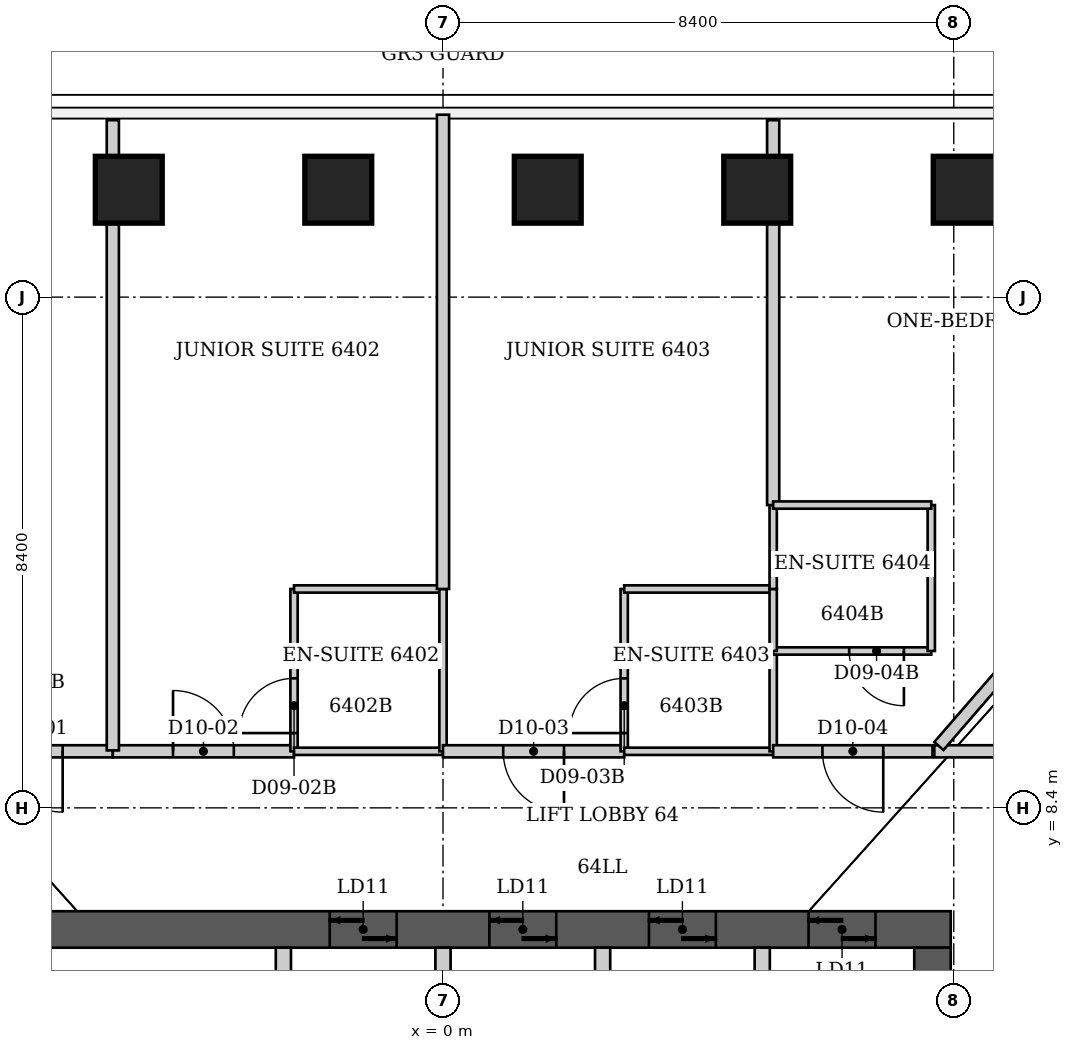
"""IFC4 building model, lengths in metres.
Left out: names, types, materials, properties, quantities, classifications, styles, units other than length and angle.
Written with IfcOpenShell. Run it as: python <this file> out.ifc"""

import sys

from ifc_helpers import new_model, si_unit, direction, frame, frame_2d, origin, origin_2d, place, context, subcontext, project, spatial, rectangle, extrude, clip, halfspace, element, fill, save


model = new_model("IFC4")
c1 = context("Model", 3, precision=1e-05, world=origin(), true_north=direction((0.0, 1.0)))
c2 = subcontext(c1, "Body", "Model", "MODEL_VIEW")
j1 = project(units=[si_unit("LENGTHUNIT", "METRE"), si_unit("PLANEANGLEUNIT", "RADIAN")], contexts=[c1])
p1 = place(None, origin())
s1 = spatial("IfcSite", under=j1, at=p1, CompositionType="ELEMENT")
p2 = place(p1, origin())
s2 = spatial("IfcBuilding", under=s1, at=p2, CompositionType="ELEMENT")
p3 = place(p2, frame((0.0, 0.0, 257.0)))
s3 = spatial("IfcBuildingStorey", under=s2, at=p3, CompositionType="ELEMENT", Elevation=257.0)
p4 = place(p3, frame((-5.167, 18.566, -0.052), z_axis=(0.0, 0.0, 1.0), x_axis=(0.0, 1.0, 0.0)))
e1 = element("IfcColumn", 1, at=p4, inside=s3, PredefinedType="COLUMN", context=c2, shape_type="SweptSolid", body=[
    clip(extrude(rectangle(XDim=1.1, YDim=1.1, at=origin_2d()), origin(), (0.0, 0.0, 1.0), 3.852), halfspace(frame((0.0, 0.0, 0.052)), True)),
])
for number, where, z_axis, x_axis in (
    (2, (-1.722, 18.566, -0.045), (0.0, 0.0, 1.0), (0.0, 1.0, 0.0)),
    (3, (1.722, 18.566, -0.045), (0.0, 0.0, 1.0), (0.0, 1.0, 0.0)),
):
    element("IfcColumn", number, at=place(p3, frame(where, z_axis=z_axis, x_axis=x_axis)), inside=s3, PredefinedType="COLUMN", context=c2, shape_type="SweptSolid", body=[
        clip(extrude(rectangle(XDim=1.1, YDim=1.1, at=origin_2d()), origin(), (0.0, 0.0, 1.0), 3.845), halfspace(frame((0.0, 0.0, 0.045)), True)),
    ])
p5 = place(p3, frame((5.167, 18.566, -0.052), z_axis=(0.0, 0.0, 1.0), x_axis=(0.0, 1.0, 0.0)))
e4 = element("IfcColumn", 4, at=p5, inside=s3, PredefinedType="COLUMN", context=c2, shape_type="SweptSolid", body=[
    clip(extrude(rectangle(XDim=1.1, YDim=1.1, at=origin_2d()), origin(), (0.0, 0.0, 1.0), 3.852), halfspace(frame((0.0, 0.0, 0.052)), True)),
])
p6 = place(p3, frame((8.613, 18.566, -0.06), z_axis=(0.0, 0.0, 1.0), x_axis=(0.0, 1.0, 0.0)))
e5 = element("IfcColumn", 5, at=p6, inside=s3, PredefinedType="COLUMN", context=c2, shape_type="SweptSolid", body=[
    clip(extrude(rectangle(XDim=1.1, YDim=1.1, at=origin_2d()), origin(), (0.0, 0.0, 1.0), 3.86), halfspace(frame((0.0, 0.0, 0.06)), True)),
])
p7 = place(p3, frame((-8.35, 6.4, 0.0), z_axis=(0.0, 0.0, 1.0), x_axis=(1.0, 0.0, 0.0)))
e6 = element("IfcWall", 6, at=p7, inside=s3, PredefinedType="SHEAR", context=c2, shape_type="SweptSolid", body=[
    extrude(rectangle(XDim=16.7, YDim=0.6, at=frame_2d((8.35, 0.0))), origin(), (0.0, 0.0, 1.0), 3.8),
])
p8 = place(p7, frame((6.488, 0.0, 0.0)))
e7 = element("IfcOpeningElement", 7, at=p8, cuts=e6, PredefinedType="OPENING", context=c2, shape_type="SweptSolid", body=[
    extrude(rectangle(XDim=1.1, YDim=2.1, at=frame_2d((0.55, 1.05))), frame((0.0, 0.3, 0.0), z_axis=(0.0, -1.0, 0.0), x_axis=(1.0, 0.0, 0.0)), (0.0, 0.0, 1.0), 0.6),
])
p9 = place(p7, frame((9.113, 0.0, 0.0)))
e8 = element("IfcOpeningElement", 8, at=p9, cuts=e6, PredefinedType="OPENING", context=c2, shape_type="SweptSolid", body=[
    extrude(rectangle(XDim=1.1, YDim=2.1, at=frame_2d((0.55, 1.05))), frame((0.0, 0.3, 0.0), z_axis=(0.0, -1.0, 0.0), x_axis=(1.0, 0.0, 0.0)), (0.0, 0.0, 1.0), 0.6),
])
p10 = place(p7, frame((11.738, 0.0, 0.0)))
e9 = element("IfcOpeningElement", 9, at=p10, cuts=e6, PredefinedType="OPENING", context=c2, shape_type="SweptSolid", body=[
    extrude(rectangle(XDim=1.1, YDim=2.1, at=frame_2d((0.55, 1.05))), frame((0.0, 0.3, 0.0), z_axis=(0.0, -1.0, 0.0), x_axis=(1.0, 0.0, 0.0)), (0.0, 0.0, 1.0), 0.6),
])
p11 = place(p7, frame((14.363, 0.0, 0.0)))
e10 = element("IfcOpeningElement", 10, at=p11, cuts=e6, PredefinedType="OPENING", context=c2, shape_type="SweptSolid", body=[
    extrude(rectangle(XDim=1.1, YDim=2.1, at=frame_2d((0.55, 1.05))), frame((0.0, 0.3, 0.0), z_axis=(0.0, -1.0, 0.0), x_axis=(1.0, 0.0, 0.0)), (0.0, 0.0, 1.0), 0.6),
])
p12 = place(p3, frame((8.05, -6.1, 0.0), z_axis=(0.0, 0.0, 1.0), x_axis=(0.0, 1.0, 0.0)))
e11 = element("IfcWall", 11, at=p12, inside=s3, PredefinedType="SHEAR", context=c2, shape_type="SweptSolid", body=[
    extrude(rectangle(XDim=12.2, YDim=0.6, at=frame_2d((6.1, 0.0))), origin(), (0.0, 0.0, 1.0), 3.8),
])
p13 = place(p12, frame((7.6, 0.0, 0.0)))
e12 = element("IfcOpeningElement", 12, at=p13, cuts=e11, PredefinedType="OPENING", context=c2, shape_type="SweptSolid", body=[
    extrude(rectangle(XDim=1.2, YDim=2.2, at=frame_2d((0.6, 1.1))), frame((0.0, 0.3, 0.0), z_axis=(0.0, -1.0, 0.0), x_axis=(1.0, 0.0, 0.0)), (0.0, 0.0, 1.0), 0.6),
])
for number, where, z_axis, x_axis in (
    (13, (-2.625, 3.35, 0.0), (0.0, 0.0, 1.0), (0.0, 1.0, 0.0)),
    (14, (0.0, 3.35, 0.0), (0.0, 0.0, 1.0), (0.0, 1.0, 0.0)),
    (15, (2.625, 3.35, 0.0), (0.0, 0.0, 1.0), (0.0, 1.0, 0.0)),
    (16, (5.25, 3.35, 0.0), (0.0, 0.0, 1.0), (0.0, 1.0, 0.0)),
):
    element("IfcWall", number, at=place(p3, frame(where, z_axis=z_axis, x_axis=x_axis)), inside=s3, PredefinedType="PARTITIONING", context=c2, shape_type="SweptSolid", body=[
        extrude(rectangle(XDim=2.75, YDim=0.25, at=frame_2d((1.375, 0.0))), origin(), (0.0, 0.0, 1.0), 3.8),
    ])
p14 = place(p3, frame((-5.43, 9.33, 0.0), z_axis=(0.0, 0.0, 1.0), x_axis=(-1.0, 0.0, 0.0)))
e17 = element("IfcWall", 17, at=p14, inside=s3, PredefinedType="PARTITIONING", context=c2, shape_type="SweptSolid", body=[
    extrude(rectangle(XDim=2.65, YDim=0.2, at=frame_2d((1.325, 0.0))), origin(), (0.0, 0.0, 1.0), 3.64),
])
p15 = place(p14, frame((0.825, 0.0, 0.0)))
e18 = element("IfcOpeningElement", 18, at=p15, cuts=e17, PredefinedType="OPENING", context=c2, shape_type="SweptSolid", body=[
    extrude(rectangle(XDim=1.0, YDim=2.13, at=frame_2d((0.5, 1.065))), frame((0.0, 0.1, 0.0), z_axis=(0.0, -1.0, 0.0), x_axis=(1.0, 0.0, 0.0)), (0.0, 0.0, 1.0), 0.2),
])
p16 = place(p3, frame((-5.43, 9.33, 0.0), z_axis=(0.0, 0.0, 1.0), x_axis=(1.0, 0.0, 0.0)))
e19 = element("IfcWall", 19, at=p16, inside=s3, PredefinedType="PARTITIONING", context=c2, shape_type="SweptSolid", body=[
    extrude(rectangle(XDim=2.98, YDim=0.2, at=frame_2d((1.49, 0.0))), origin(), (0.0, 0.0, 1.0), 3.64),
])
p17 = place(p16, frame((0.99, 0.0, 0.0)))
e20 = element("IfcOpeningElement", 20, at=p17, cuts=e19, PredefinedType="OPENING", context=c2, shape_type="SweptSolid", body=[
    extrude(rectangle(XDim=1.0, YDim=2.13, at=frame_2d((0.5, 1.065))), frame((0.0, 0.1, 0.0), z_axis=(0.0, -1.0, 0.0), x_axis=(1.0, 0.0, 0.0)), (0.0, 0.0, 1.0), 0.2),
])
p18 = place(p3, frame((-5.43, 19.71, 0.0), z_axis=(0.0, 0.0, 1.0), x_axis=(0.0, -1.0, 0.0)))
e21 = element("IfcWall", 21, at=p18, inside=s3, PredefinedType="PARTITIONING", context=c2, shape_type="SweptSolid", body=[
    extrude(rectangle(XDim=10.365, YDim=0.2, at=frame_2d((5.183, 0.0))), origin(), (0.0, 0.0, 1.0), 3.64),
])
p19 = place(p3, frame((-2.45, 12.0, 0.0), z_axis=(0.0, 0.0, 1.0), x_axis=(0.0, -1.0, 0.0)))
e22 = element("IfcWall", 22, at=p19, inside=s3, PredefinedType="PARTITIONING", context=c2, shape_type="SweptSolid", body=[
    extrude(rectangle(XDim=2.67, YDim=0.12, at=frame_2d((1.335, 0.0))), origin(), (0.0, 0.0, 1.0), 3.64),
])
p20 = place(p19, frame((1.47, 0.0, 0.0)))
e23 = element("IfcOpeningElement", 23, at=p20, cuts=e22, PredefinedType="OPENING", context=c2, shape_type="SweptSolid", body=[
    extrude(rectangle(XDim=0.9, YDim=2.03, at=frame_2d((0.45, 1.015))), frame((0.0, 0.06, 0.0), z_axis=(0.0, -1.0, 0.0), x_axis=(1.0, 0.0, 0.0)), (0.0, 0.0, 1.0), 0.12),
])
for number, where, z_axis, x_axis in (
    (24, (0.0, 9.33, 0.0), (0.0, 0.0, 1.0), (-1.0, 0.0, 0.0)),
    (25, (0.0, 12.0, 0.0), (0.0, 0.0, 1.0), (-1.0, 0.0, 0.0)),
):
    element("IfcWall", number, at=place(p3, frame(where, z_axis=z_axis, x_axis=x_axis)), inside=s3, PredefinedType="PARTITIONING", context=c2, shape_type="SweptSolid", body=[
        extrude(rectangle(XDim=2.45, YDim=0.12, at=frame_2d((1.225, 0.0))), origin(), (0.0, 0.0, 1.0), 3.64),
    ])
p21 = place(p3, frame((0.0, 12.0, 0.0), z_axis=(0.0, 0.0, 1.0), x_axis=(0.0, -1.0, 0.0)))
e26 = element("IfcWall", 26, at=p21, inside=s3, PredefinedType="PARTITIONING", context=c2, shape_type="SweptSolid", body=[
    extrude(rectangle(XDim=2.67, YDim=0.12, at=frame_2d((1.335, 0.0))), origin(), (0.0, 0.0, 1.0), 3.023),
])
p22 = place(p3, frame((0.0, 19.8, 0.0), z_axis=(0.0, 0.0, 1.0), x_axis=(0.0, -1.0, 0.0)))
e27 = element("IfcWall", 27, at=p22, inside=s3, PredefinedType="PARTITIONING", context=c2, shape_type="SweptSolid", body=[
    extrude(rectangle(XDim=7.8, YDim=0.2, at=frame_2d((3.9, 0.0))), origin(), (0.0, 0.0, 1.0), 3.023),
])
p23 = place(p3, frame((2.98, 9.33, 0.0), z_axis=(0.0, 0.0, 1.0), x_axis=(-1.0, 0.0, 0.0)))
e28 = element("IfcWall", 28, at=p23, inside=s3, PredefinedType="PARTITIONING", context=c2, shape_type="SweptSolid", body=[
    extrude(rectangle(XDim=2.98, YDim=0.2, at=frame_2d((1.49, 0.0))), origin(), (0.0, 0.0, 1.0), 3.64),
])
p24 = place(p23, frame((0.99, 0.0, 0.0)))
e29 = element("IfcOpeningElement", 29, at=p24, cuts=e28, PredefinedType="OPENING", context=c2, shape_type="SweptSolid", body=[
    extrude(rectangle(XDim=1.0, YDim=2.13, at=frame_2d((0.5, 1.065))), frame((0.0, 0.1, 0.0), z_axis=(0.0, -1.0, 0.0), x_axis=(1.0, 0.0, 0.0)), (0.0, 0.0, 1.0), 0.2),
])
p25 = place(p3, frame((2.98, 12.0, 0.0), z_axis=(0.0, 0.0, 1.0), x_axis=(0.0, -1.0, 0.0)))
e30 = element("IfcWall", 30, at=p25, inside=s3, PredefinedType="PARTITIONING", context=c2, shape_type="SweptSolid", body=[
    extrude(rectangle(XDim=2.67, YDim=0.12, at=frame_2d((1.335, 0.0))), origin(), (0.0, 0.0, 1.0), 3.64),
])
p26 = place(p25, frame((1.47, 0.0, 0.0)))
e31 = element("IfcOpeningElement", 31, at=p26, cuts=e30, PredefinedType="OPENING", context=c2, shape_type="SweptSolid", body=[
    extrude(rectangle(XDim=0.9, YDim=2.03, at=frame_2d((0.45, 1.015))), frame((0.0, 0.06, 0.0), z_axis=(0.0, -1.0, 0.0), x_axis=(1.0, 0.0, 0.0)), (0.0, 0.0, 1.0), 0.12),
])
p27 = place(p3, frame((5.43, 9.33, 0.0), z_axis=(0.0, 0.0, 1.0), x_axis=(-1.0, 0.0, 0.0)))
e32 = element("IfcWall", 32, at=p27, inside=s3, PredefinedType="PARTITIONING", context=c2, shape_type="SweptSolid", body=[
    extrude(rectangle(XDim=2.45, YDim=0.12, at=frame_2d((1.225, 0.0))), origin(), (0.0, 0.0, 1.0), 3.64),
])
p28 = place(p3, frame((5.43, 10.98, 0.0), z_axis=(0.0, 0.0, 1.0), x_axis=(0.0, -1.0, 0.0)))
e33 = element("IfcWall", 33, at=p28, inside=s3, PredefinedType="PARTITIONING", context=c2, shape_type="SweptSolid", body=[
    extrude(rectangle(XDim=1.65, YDim=0.12, at=frame_2d((0.825, 0.0))), origin(), (0.0, 0.0, 1.0), 3.64),
])
p29 = place(p3, frame((5.43, 10.98, 0.0), z_axis=(0.0, 0.0, 1.0), x_axis=(1.0, 0.0, 0.0)))
e34 = element("IfcWall", 34, at=p29, inside=s3, PredefinedType="PARTITIONING", context=c2, shape_type="SweptSolid", body=[
    extrude(rectangle(XDim=2.6, YDim=0.12, at=frame_2d((1.3, 0.0))), origin(), (0.0, 0.0, 1.0), 3.64),
])
p30 = place(p29, frame((1.25, 0.0, 0.0)))
e35 = element("IfcOpeningElement", 35, at=p30, cuts=e34, PredefinedType="OPENING", context=c2, shape_type="SweptSolid", body=[
    extrude(rectangle(XDim=0.9, YDim=2.03, at=frame_2d((0.45, 1.015))), frame((0.0, 0.06, 0.0), z_axis=(0.0, -1.0, 0.0), x_axis=(1.0, 0.0, 0.0)), (0.0, 0.0, 1.0), 0.12),
])
p31 = place(p3, frame((5.43, 12.0, 0.0), z_axis=(0.0, 0.0, 1.0), x_axis=(-1.0, 0.0, 0.0)))
e36 = element("IfcWall", 36, at=p31, inside=s3, PredefinedType="PARTITIONING", context=c2, shape_type="SweptSolid", body=[
    extrude(rectangle(XDim=2.45, YDim=0.12, at=frame_2d((1.225, 0.0))), origin(), (0.0, 0.0, 1.0), 3.64),
])
p32 = place(p3, frame((5.43, 12.0, 0.0), z_axis=(0.0, 0.0, 1.0), x_axis=(0.0, -1.0, 0.0)))
e37 = element("IfcWall", 37, at=p32, inside=s3, PredefinedType="PARTITIONING", context=c2, shape_type="SweptSolid", body=[
    extrude(rectangle(XDim=1.02, YDim=0.12, at=frame_2d((0.51, 0.0))), origin(), (0.0, 0.0, 1.0), 3.64),
])
p33 = place(p3, frame((5.43, 13.38, 0.0), z_axis=(0.0, 0.0, 1.0), x_axis=(0.0, -1.0, 0.0)))
e38 = element("IfcWall", 38, at=p33, inside=s3, PredefinedType="PARTITIONING", context=c2, shape_type="SweptSolid", body=[
    extrude(rectangle(XDim=1.38, YDim=0.12, at=frame_2d((0.69, 0.0))), origin(), (0.0, 0.0, 1.0), 3.64),
])
p34 = place(p3, frame((5.43, 19.71, 0.0), z_axis=(0.0, 0.0, 1.0), x_axis=(0.0, -1.0, 0.0)))
e39 = element("IfcWall", 39, at=p34, inside=s3, PredefinedType="PARTITIONING", context=c2, shape_type="SweptSolid", body=[
    extrude(rectangle(XDim=6.33, YDim=0.2, at=frame_2d((3.165, 0.0))), origin(), (0.0, 0.0, 1.0), 3.64),
])
p35 = place(p3, frame((8.03, 10.98, 0.0), z_axis=(0.0, 0.0, 1.0), x_axis=(0.0, 1.0, 0.0)))
e40 = element("IfcWall", 40, at=p35, inside=s3, PredefinedType="PARTITIONING", context=c2, shape_type="SweptSolid", body=[
    extrude(rectangle(XDim=2.4, YDim=0.12, at=frame_2d((1.2, 0.0))), origin(), (0.0, 0.0, 1.0), 3.64),
])
p36 = place(p3, frame((8.03, 13.38, 0.0), z_axis=(0.0, 0.0, 1.0), x_axis=(-1.0, 0.0, 0.0)))
e41 = element("IfcWall", 41, at=p36, inside=s3, PredefinedType="PARTITIONING", context=c2, shape_type="SweptSolid", body=[
    extrude(rectangle(XDim=2.6, YDim=0.12, at=frame_2d((1.3, 0.0))), origin(), (0.0, 0.0, 1.0), 3.64),
])
p37 = place(p3, frame((8.05, 9.33, 0.0), z_axis=(0.0, 0.0, 1.0), x_axis=(-1.0, 0.0, 0.0)))
e42 = element("IfcWall", 42, at=p37, inside=s3, PredefinedType="PARTITIONING", context=c2, shape_type="SweptSolid", body=[
    extrude(rectangle(XDim=2.62, YDim=0.2, at=frame_2d((1.31, 0.0))), origin(), (0.0, 0.0, 1.0), 3.64),
])
p38 = place(p37, frame((0.81, 0.0, 0.0)))
e43 = element("IfcOpeningElement", 43, at=p38, cuts=e42, PredefinedType="OPENING", context=c2, shape_type="SweptSolid", body=[
    extrude(rectangle(XDim=1.0, YDim=2.13, at=frame_2d((0.5, 1.065))), frame((0.0, 0.1, 0.0), z_axis=(0.0, -1.0, 0.0), x_axis=(1.0, 0.0, 0.0)), (0.0, 0.0, 1.0), 0.2),
])
p39 = place(p3, frame((11.19, 9.33, 0.0), z_axis=(0.0, 0.0, 1.0), x_axis=(-1.0, 0.0, 0.0)))
e44 = element("IfcWall", 44, at=p39, inside=s3, PredefinedType="PARTITIONING", context=c2, shape_type="SweptSolid", body=[
    extrude(rectangle(XDim=3.11, YDim=0.2, at=frame_2d((1.555, 0.0))), origin(), (0.0, 0.0, 1.0), 3.64),
])
p40 = place(p39, frame((1.055, 0.0, 0.0)))
e45 = element("IfcOpeningElement", 45, at=p40, cuts=e44, PredefinedType="OPENING", context=c2, shape_type="SweptSolid", body=[
    extrude(rectangle(XDim=1.0, YDim=2.13, at=frame_2d((0.5, 1.065))), frame((0.0, 0.1, 0.0), z_axis=(0.0, -1.0, 0.0), x_axis=(1.0, 0.0, 0.0)), (0.0, 0.0, 1.0), 0.2),
])
p41 = place(p3, frame((16.89, 19.507, 0.0), z_axis=(0.0, 0.0, 1.0), x_axis=(-0.654509091565, -0.756054131037, 0.0)))
e46 = element("IfcWall", 46, at=p41, inside=s3, PredefinedType="PARTITIONING", context=c2, shape_type="SweptSolid", body=[
    extrude(rectangle(XDim=13.346, YDim=0.2, at=frame_2d((6.673, 0.0))), origin(), (0.0, 0.0, 1.0), 3.64),
])
p42 = place(p15, origin())
e47 = element("IfcDoor", 47, at=p42, inside=s3, OperationType="SINGLE_SWING_LEFT", PredefinedType="DOOR", context=c2, shape_type="SweptSolid", body=[
    extrude(rectangle(XDim=1.0, YDim=2.13, at=frame_2d((0.5, 1.065))), frame((0.0, 0.025, 0.0), z_axis=(0.0, -1.0, 0.0), x_axis=(1.0, 0.0, 0.0)), (0.0, 0.0, 1.0), 0.05),
])
fill(e18, e47)
p43 = place(p17, origin())
e48 = element("IfcDoor", 48, at=p43, inside=s3, OperationType="SINGLE_SWING_LEFT", PredefinedType="DOOR", context=c2, shape_type="SweptSolid", body=[
    extrude(rectangle(XDim=1.0, YDim=2.13, at=frame_2d((0.5, 1.065))), frame((0.0, 0.025, 0.0), z_axis=(0.0, -1.0, 0.0), x_axis=(1.0, 0.0, 0.0)), (0.0, 0.0, 1.0), 0.05),
])
fill(e20, e48)
p44 = place(p20, origin())
e49 = element("IfcDoor", 49, at=p44, inside=s3, OperationType="SINGLE_SWING_RIGHT", PredefinedType="DOOR", context=c2, shape_type="SweptSolid", body=[
    extrude(rectangle(XDim=0.9, YDim=2.03, at=frame_2d((0.45, 1.015))), frame((0.0, 0.025, 0.0), z_axis=(0.0, -1.0, 0.0), x_axis=(1.0, 0.0, 0.0)), (0.0, 0.0, 1.0), 0.05),
])
fill(e23, e49)
p45 = place(p24, origin())
e50 = element("IfcDoor", 50, at=p45, inside=s3, OperationType="SINGLE_SWING_LEFT", PredefinedType="DOOR", context=c2, shape_type="SweptSolid", body=[
    extrude(rectangle(XDim=1.0, YDim=2.13, at=frame_2d((0.5, 1.065))), frame((0.0, 0.025, 0.0), z_axis=(0.0, -1.0, 0.0), x_axis=(1.0, 0.0, 0.0)), (0.0, 0.0, 1.0), 0.05),
])
fill(e29, e50)
p46 = place(p26, origin())
e51 = element("IfcDoor", 51, at=p46, inside=s3, OperationType="SINGLE_SWING_RIGHT", PredefinedType="DOOR", context=c2, shape_type="SweptSolid", body=[
    extrude(rectangle(XDim=0.9, YDim=2.03, at=frame_2d((0.45, 1.015))), frame((0.0, 0.025, 0.0), z_axis=(0.0, -1.0, 0.0), x_axis=(1.0, 0.0, 0.0)), (0.0, 0.0, 1.0), 0.05),
])
fill(e31, e51)
p47 = place(p38, origin())
e52 = element("IfcDoor", 52, at=p47, inside=s3, OperationType="SINGLE_SWING_LEFT", PredefinedType="DOOR", context=c2, shape_type="SweptSolid", body=[
    extrude(rectangle(XDim=1.0, YDim=2.13, at=frame_2d((0.5, 1.065))), frame((0.0, 0.025, 0.0), z_axis=(0.0, -1.0, 0.0), x_axis=(1.0, 0.0, 0.0)), (0.0, 0.0, 1.0), 0.05),
])
fill(e43, e52)
p48 = place(p30, origin())
e53 = element("IfcDoor", 53, at=p48, inside=s3, OperationType="SINGLE_SWING_RIGHT", PredefinedType="DOOR", context=c2, shape_type="SweptSolid", body=[
    extrude(rectangle(XDim=0.9, YDim=2.03, at=frame_2d((0.45, 1.015))), frame((0.0, 0.025, 0.0), z_axis=(0.0, -1.0, 0.0), x_axis=(1.0, 0.0, 0.0)), (0.0, 0.0, 1.0), 0.05),
])
fill(e35, e53)
p49 = place(p8, origin())
e54 = element("IfcDoor", 54, at=p49, inside=s3, OperationType="DOUBLE_DOOR_SLIDING", PredefinedType="DOOR", context=c2, shape_type="SweptSolid", body=[
    extrude(rectangle(XDim=1.1, YDim=2.1, at=frame_2d((0.55, 1.05))), frame((0.0, 0.025, 0.0), z_axis=(0.0, -1.0, 0.0), x_axis=(1.0, 0.0, 0.0)), (0.0, 0.0, 1.0), 0.05),
])
fill(e7, e54)
p50 = place(p9, origin())
e55 = element("IfcDoor", 55, at=p50, inside=s3, OperationType="DOUBLE_DOOR_SLIDING", PredefinedType="DOOR", context=c2, shape_type="SweptSolid", body=[
    extrude(rectangle(XDim=1.1, YDim=2.1, at=frame_2d((0.55, 1.05))), frame((0.0, 0.025, 0.0), z_axis=(0.0, -1.0, 0.0), x_axis=(1.0, 0.0, 0.0)), (0.0, 0.0, 1.0), 0.05),
])
fill(e8, e55)
p51 = place(p10, origin())
e56 = element("IfcDoor", 56, at=p51, inside=s3, OperationType="DOUBLE_DOOR_SLIDING", PredefinedType="DOOR", context=c2, shape_type="SweptSolid", body=[
    extrude(rectangle(XDim=1.1, YDim=2.1, at=frame_2d((0.55, 1.05))), frame((0.0, 0.025, 0.0), z_axis=(0.0, -1.0, 0.0), x_axis=(1.0, 0.0, 0.0)), (0.0, 0.0, 1.0), 0.05),
])
fill(e9, e56)
p52 = place(p11, origin())
e57 = element("IfcDoor", 57, at=p52, inside=s3, OperationType="DOUBLE_DOOR_SLIDING", PredefinedType="DOOR", context=c2, shape_type="SweptSolid", body=[
    extrude(rectangle(XDim=1.1, YDim=2.1, at=frame_2d((0.55, 1.05))), frame((0.0, 0.025, 0.0), z_axis=(0.0, -1.0, 0.0), x_axis=(1.0, 0.0, 0.0)), (0.0, 0.0, 1.0), 0.05),
])
fill(e10, e57)
save(model, sys.argv[1])
